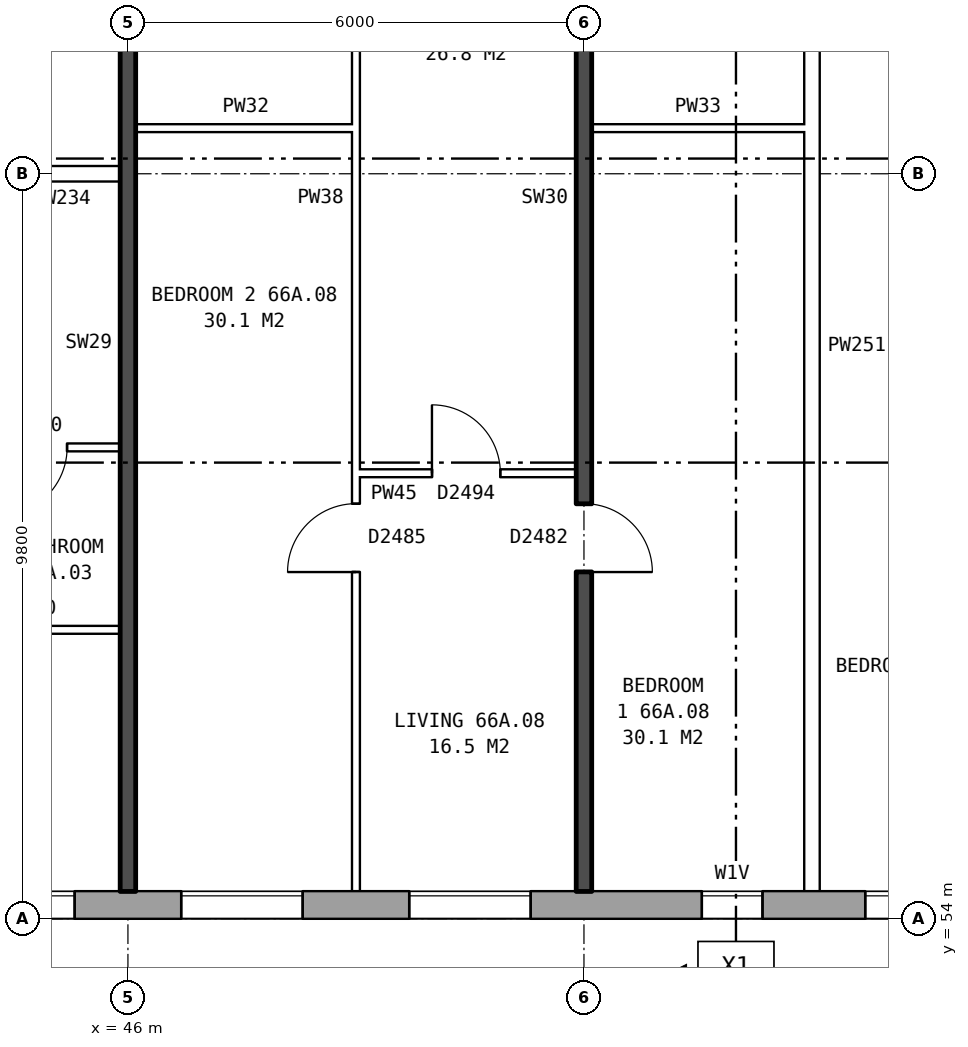
"""IFC4 building model, lengths in metres.
Left out: names, types, materials, properties, quantities, classifications, styles, units other than length and angle.
Written with IfcOpenShell. Run it as: python <this file> out.ifc"""

import sys

from ifc_helpers import new_model, si_unit, direction, frame, frame_2d, origin, place, context, subcontext, project, spatial, rectangle, extrude, element, fill, save


model = new_model("IFC4")
c1 = context("Model", 3, precision=1e-05, world=origin(), true_north=direction((0.0, 1.0)))
c2 = subcontext(c1, "Body", "Model", "MODEL_VIEW")
j1 = project(units=[si_unit("LENGTHUNIT", "METRE"), si_unit("PLANEANGLEUNIT", "RADIAN")], contexts=[c1])
p1 = place(None, origin())
s1 = spatial("IfcSite", under=j1, at=p1, CompositionType="ELEMENT")
p2 = place(p1, origin())
s2 = spatial("IfcBuilding", under=s1, at=p2, CompositionType="ELEMENT")
p3 = place(p2, frame((0.0, 0.0, 233.8)))
s3 = spatial("IfcBuildingStorey", under=s2, at=p3, CompositionType="ELEMENT", Elevation=233.8)
p4 = place(p3, frame((35.075, 54.18, 0.0), z_axis=(0.0, 0.0, 1.0), x_axis=(1.0, 0.0, 0.0)))
e1 = element("IfcWall", 1, at=p4, inside=s3, PredefinedType="STANDARD", context=c2, shape_type="SweptSolid", body=[
    extrude(rectangle(XDim=39.875, YDim=0.36, at=frame_2d((19.938, 0.0))), origin(), (0.0, 0.0, 1.0), 2.85),
])
p5 = place(p4, frame((2.625, 0.0, 0.8)))
e2 = element("IfcOpeningElement", 2, at=p5, cuts=e1, PredefinedType="OPENING", context=c2, shape_type="SweptSolid", body=[
    extrude(rectangle(XDim=1.6, YDim=1.8, at=frame_2d((0.8, 0.9))), frame((0.0, 0.19, 0.0), z_axis=(0.0, -1.0, 0.0), x_axis=(1.0, 0.0, 0.0)), (0.0, 0.0, 1.0), 0.38),
])
p6 = place(p4, frame((5.625, 0.0, 0.8)))
e3 = element("IfcOpeningElement", 3, at=p6, cuts=e1, PredefinedType="OPENING", context=c2, shape_type="SweptSolid", body=[
    extrude(rectangle(XDim=1.6, YDim=1.8, at=frame_2d((0.8, 0.9))), frame((0.0, 0.19, 0.0), z_axis=(0.0, -1.0, 0.0), x_axis=(1.0, 0.0, 0.0)), (0.0, 0.0, 1.0), 0.38),
])
p7 = place(p4, frame((8.625, 0.0, 0.8)))
e4 = element("IfcOpeningElement", 4, at=p7, cuts=e1, PredefinedType="OPENING", context=c2, shape_type="SweptSolid", body=[
    extrude(rectangle(XDim=1.6, YDim=1.8, at=frame_2d((0.8, 0.9))), frame((0.0, 0.19, 0.0), z_axis=(0.0, -1.0, 0.0), x_axis=(1.0, 0.0, 0.0)), (0.0, 0.0, 1.0), 0.38),
])
p8 = place(p4, frame((11.625, 0.0, 0.8)))
e5 = element("IfcOpeningElement", 5, at=p8, cuts=e1, PredefinedType="OPENING", context=c2, shape_type="SweptSolid", body=[
    extrude(rectangle(XDim=1.6, YDim=1.8, at=frame_2d((0.8, 0.9))), frame((0.0, 0.19, 0.0), z_axis=(0.0, -1.0, 0.0), x_axis=(1.0, 0.0, 0.0)), (0.0, 0.0, 1.0), 0.38),
])
p9 = place(p4, frame((14.625, 0.0, 0.8)))
e6 = element("IfcOpeningElement", 6, at=p9, cuts=e1, PredefinedType="OPENING", context=c2, shape_type="SweptSolid", body=[
    extrude(rectangle(XDim=1.6, YDim=1.8, at=frame_2d((0.8, 0.9))), frame((0.0, 0.19, 0.0), z_axis=(0.0, -1.0, 0.0), x_axis=(1.0, 0.0, 0.0)), (0.0, 0.0, 1.0), 0.38),
])
p10 = place(p4, frame((18.475, 0.0, 0.15)))
e7 = element("IfcOpeningElement", 7, at=p10, cuts=e1, PredefinedType="OPENING", context=c2, shape_type="SweptSolid", body=[
    extrude(rectangle(XDim=0.8, YDim=0.9, at=frame_2d((0.4, 0.45))), frame((0.0, 0.19, 0.0), z_axis=(0.0, -1.0, 0.0), x_axis=(1.0, 0.0, 0.0)), (0.0, 0.0, 1.0), 0.38),
])
p11 = place(p4, frame((20.625, 0.0, 0.8)))
e8 = element("IfcOpeningElement", 8, at=p11, cuts=e1, PredefinedType="OPENING", context=c2, shape_type="SweptSolid", body=[
    extrude(rectangle(XDim=1.6, YDim=1.8, at=frame_2d((0.8, 0.9))), frame((0.0, 0.19, 0.0), z_axis=(0.0, -1.0, 0.0), x_axis=(1.0, 0.0, 0.0)), (0.0, 0.0, 1.0), 0.38),
])
p12 = place(p4, frame((23.625, 0.0, 0.8)))
e9 = element("IfcOpeningElement", 9, at=p12, cuts=e1, PredefinedType="OPENING", context=c2, shape_type="SweptSolid", body=[
    extrude(rectangle(XDim=1.6, YDim=1.8, at=frame_2d((0.8, 0.9))), frame((0.0, 0.19, 0.0), z_axis=(0.0, -1.0, 0.0), x_axis=(1.0, 0.0, 0.0)), (0.0, 0.0, 1.0), 0.38),
])
p13 = place(p4, frame((26.625, 0.0, 0.8)))
e10 = element("IfcOpeningElement", 10, at=p13, cuts=e1, PredefinedType="OPENING", context=c2, shape_type="SweptSolid", body=[
    extrude(rectangle(XDim=1.6, YDim=1.8, at=frame_2d((0.8, 0.9))), frame((0.0, 0.19, 0.0), z_axis=(0.0, -1.0, 0.0), x_axis=(1.0, 0.0, 0.0)), (0.0, 0.0, 1.0), 0.38),
])
p14 = place(p4, frame((29.625, 0.0, 0.8)))
e11 = element("IfcOpeningElement", 11, at=p14, cuts=e1, PredefinedType="OPENING", context=c2, shape_type="SweptSolid", body=[
    extrude(rectangle(XDim=1.6, YDim=1.8, at=frame_2d((0.8, 0.9))), frame((0.0, 0.19, 0.0), z_axis=(0.0, -1.0, 0.0), x_axis=(1.0, 0.0, 0.0)), (0.0, 0.0, 1.0), 0.38),
])
p15 = place(p4, frame((32.625, 0.0, 0.8)))
e12 = element("IfcOpeningElement", 12, at=p15, cuts=e1, PredefinedType="OPENING", context=c2, shape_type="SweptSolid", body=[
    extrude(rectangle(XDim=1.6, YDim=1.8, at=frame_2d((0.8, 0.9))), frame((0.0, 0.19, 0.0), z_axis=(0.0, -1.0, 0.0), x_axis=(1.0, 0.0, 0.0)), (0.0, 0.0, 1.0), 0.38),
])
p16 = place(p4, frame((35.625, 0.0, 0.8)))
e13 = element("IfcOpeningElement", 13, at=p16, cuts=e1, PredefinedType="OPENING", context=c2, shape_type="SweptSolid", body=[
    extrude(rectangle(XDim=1.6, YDim=1.8, at=frame_2d((0.8, 0.9))), frame((0.0, 0.19, 0.0), z_axis=(0.0, -1.0, 0.0), x_axis=(1.0, 0.0, 0.0)), (0.0, 0.0, 1.0), 0.38),
])
p17 = place(p3, frame((43.6, 57.8, 0.0), z_axis=(0.0, 0.0, 1.0), x_axis=(1.0, 0.0, 0.0)))
e14 = element("IfcWall", 14, at=p17, inside=s3, PredefinedType="PARTITIONING", context=c2, shape_type="SweptSolid", body=[
    extrude(rectangle(XDim=2.3, YDim=0.1, at=frame_2d((1.15, 0.0))), origin(), (0.0, 0.0, 1.0), 2.85),
])
p18 = place(p3, frame((49.0, 59.86, 0.0), z_axis=(0.0, 0.0, 1.0), x_axis=(1.0, 0.0, 0.0)))
e15 = element("IfcWall", 15, at=p18, inside=s3, PredefinedType="PARTITIONING", context=c2, shape_type="SweptSolid", body=[
    extrude(rectangle(XDim=2.9, YDim=0.1, at=frame_2d((1.45, 0.0))), origin(), (0.0, 0.0, 1.0), 2.85),
])
p19 = place(p18, frame((1.0, 0.0, 0.0)))
e16 = element("IfcOpeningElement", 16, at=p19, cuts=e15, PredefinedType="OPENING", context=c2, shape_type="SweptSolid", body=[
    extrude(rectangle(XDim=0.9, YDim=2.1, at=frame_2d((0.45, 1.05))), frame((0.0, 0.06, 0.0), z_axis=(0.0, -1.0, 0.0), x_axis=(1.0, 0.0, 0.0)), (0.0, 0.0, 1.0), 0.12),
])
p20 = place(p3, frame((40.1, 60.2, 0.0), z_axis=(0.0, 0.0, 1.0), x_axis=(1.0, 0.0, 0.0)))
e17 = element("IfcWall", 17, at=p20, inside=s3, PredefinedType="PARTITIONING", context=c2, shape_type="SweptSolid", body=[
    extrude(rectangle(XDim=5.8, YDim=0.1, at=frame_2d((2.9, 0.0))), origin(), (0.0, 0.0, 1.0), 2.85),
])
p21 = place(p20, frame((1.3, 0.0, 0.0)))
e18 = element("IfcOpeningElement", 18, at=p21, cuts=e17, PredefinedType="OPENING", context=c2, shape_type="SweptSolid", body=[
    extrude(rectangle(XDim=0.9, YDim=2.1, at=frame_2d((0.45, 1.05))), frame((0.0, 0.06, 0.0), z_axis=(0.0, -1.0, 0.0), x_axis=(1.0, 0.0, 0.0)), (0.0, 0.0, 1.0), 0.12),
])
p22 = place(p20, frame((4.2, 0.0, 0.0)))
e19 = element("IfcOpeningElement", 19, at=p22, cuts=e17, PredefinedType="OPENING", context=c2, shape_type="SweptSolid", body=[
    extrude(rectangle(XDim=0.9, YDim=2.1, at=frame_2d((0.45, 1.05))), frame((0.0, 0.06, 0.0), z_axis=(0.0, -1.0, 0.0), x_axis=(1.0, 0.0, 0.0)), (0.0, 0.0, 1.0), 0.12),
])
p23 = place(p3, frame((44.36, 63.8, 0.0), z_axis=(0.0, 0.0, 1.0), x_axis=(1.0, 0.0, 0.0)))
e20 = element("IfcWall", 20, at=p23, inside=s3, PredefinedType="PARTITIONING", context=c2, shape_type="SweptSolid", body=[
    extrude(rectangle(XDim=1.54, YDim=0.2, at=frame_2d((0.77, 0.0))), origin(), (0.0, 0.0, 1.0), 2.85),
])
p24 = place(p3, frame((46.1, 64.4, 0.0), z_axis=(0.0, 0.0, 1.0), x_axis=(1.0, 0.0, 0.0)))
e21 = element("IfcWall", 21, at=p24, inside=s3, PredefinedType="PARTITIONING", context=c2, shape_type="SweptSolid", body=[
    extrude(rectangle(XDim=2.9, YDim=0.1, at=frame_2d((1.45, 0.0))), origin(), (0.0, 0.0, 1.0), 2.85),
])
p25 = place(p3, frame((52.1, 64.4, 0.0), z_axis=(0.0, 0.0, 1.0), x_axis=(1.0, 0.0, 0.0)))
e22 = element("IfcWall", 22, at=p25, inside=s3, PredefinedType="PARTITIONING", context=c2, shape_type="SweptSolid", body=[
    extrude(rectangle(XDim=2.8, YDim=0.1, at=frame_2d((1.4, 0.0))), origin(), (0.0, 0.0, 1.0), 2.85),
])
p26 = place(p3, frame((46.0, 54.36, 0.0), z_axis=(0.0, 0.0, 1.0), x_axis=(0.0, 1.0, 0.0)))
e23 = element("IfcWall", 23, at=p26, inside=s3, PredefinedType="SOLIDWALL", context=c2, shape_type="SweptSolid", body=[
    extrude(rectangle(XDim=14.44, YDim=0.2, at=frame_2d((7.22, 0.0))), origin(), (0.0, 0.0, 1.0), 2.85),
])
p27 = place(p3, frame((49.0, 54.36, 0.0), z_axis=(0.0, 0.0, 1.0), x_axis=(0.0, 1.0, 0.0)))
e24 = element("IfcWall", 24, at=p27, inside=s3, PredefinedType="PARTITIONING", context=c2, shape_type="SweptSolid", body=[
    extrude(rectangle(XDim=14.34, YDim=0.1, at=frame_2d((7.17, 0.0))), origin(), (0.0, 0.0, 1.0), 2.85),
])
p28 = place(p27, frame((4.2, 0.0, 0.0)))
e25 = element("IfcOpeningElement", 25, at=p28, cuts=e24, PredefinedType="OPENING", context=c2, shape_type="SweptSolid", body=[
    extrude(rectangle(XDim=0.9, YDim=2.1, at=frame_2d((0.45, 1.05))), frame((0.0, 0.06, 0.0), z_axis=(0.0, -1.0, 0.0), x_axis=(1.0, 0.0, 0.0)), (0.0, 0.0, 1.0), 0.12),
])
p29 = place(p27, frame((13.14, 0.0, 0.0)))
e26 = element("IfcOpeningElement", 26, at=p29, cuts=e24, PredefinedType="OPENING", context=c2, shape_type="SweptSolid", body=[
    extrude(rectangle(XDim=0.8, YDim=2.1, at=frame_2d((0.4, 1.05))), frame((0.0, 0.06, 0.0), z_axis=(0.0, -1.0, 0.0), x_axis=(1.0, 0.0, 0.0)), (0.0, 0.0, 1.0), 0.12),
])
p30 = place(p3, frame((52.0, 54.36, 0.0), z_axis=(0.0, 0.0, 1.0), x_axis=(0.0, 1.0, 0.0)))
e27 = element("IfcWall", 27, at=p30, inside=s3, PredefinedType="SOLIDWALL", context=c2, shape_type="SweptSolid", body=[
    extrude(rectangle(XDim=14.44, YDim=0.2, at=frame_2d((7.22, 0.0))), origin(), (0.0, 0.0, 1.0), 2.85),
])
p31 = place(p30, frame((4.2, 0.0, 0.0)))
e28 = element("IfcOpeningElement", 28, at=p31, cuts=e27, PredefinedType="OPENING", context=c2, shape_type="SweptSolid", body=[
    extrude(rectangle(XDim=0.9, YDim=2.1, at=frame_2d((0.45, 1.05))), frame((0.0, 0.11, 0.0), z_axis=(0.0, -1.0, 0.0), x_axis=(1.0, 0.0, 0.0)), (0.0, 0.0, 1.0), 0.22),
])
p32 = place(p30, frame((13.14, 0.0, 0.0)))
e29 = element("IfcOpeningElement", 29, at=p32, cuts=e27, PredefinedType="OPENING", context=c2, shape_type="SweptSolid", body=[
    extrude(rectangle(XDim=0.9, YDim=2.1, at=frame_2d((0.45, 1.05))), frame((0.0, 0.11, 0.0), z_axis=(0.0, -1.0, 0.0), x_axis=(1.0, 0.0, 0.0)), (0.0, 0.0, 1.0), 0.22),
])
p33 = place(p3, frame((55.0, 54.36, 0.0), z_axis=(0.0, 0.0, 1.0), x_axis=(0.0, 1.0, 0.0)))
e30 = element("IfcWall", 30, at=p33, inside=s3, PredefinedType="PARTITIONING", context=c2, shape_type="SweptSolid", body=[
    extrude(rectangle(XDim=14.34, YDim=0.2, at=frame_2d((7.17, 0.0))), origin(), (0.0, 0.0, 1.0), 2.85),
])
p34 = place(p7, origin())
e31 = element("IfcWindow", 31, at=p34, inside=s3, PartitioningType="SINGLE_PANEL", PredefinedType="WINDOW", context=c2, shape_type="SweptSolid", body=[
    extrude(rectangle(XDim=1.6, YDim=1.8, at=frame_2d((0.8, 0.9))), frame((0.0, 0.15, 0.0), z_axis=(0.0, -1.0, 0.0), x_axis=(1.0, 0.0, 0.0)), (0.0, 0.0, 1.0), 0.06),
])
fill(e4, e31)
p35 = place(p8, origin())
e32 = element("IfcWindow", 32, at=p35, inside=s3, PartitioningType="SINGLE_PANEL", PredefinedType="WINDOW", context=c2, shape_type="SweptSolid", body=[
    extrude(rectangle(XDim=1.6, YDim=1.8, at=frame_2d((0.8, 0.9))), frame((0.0, 0.15, 0.0), z_axis=(0.0, -1.0, 0.0), x_axis=(1.0, 0.0, 0.0)), (0.0, 0.0, 1.0), 0.06),
])
fill(e5, e32)
p36 = place(p9, origin())
e33 = element("IfcWindow", 33, at=p36, inside=s3, PartitioningType="SINGLE_PANEL", PredefinedType="WINDOW", context=c2, shape_type="SweptSolid", body=[
    extrude(rectangle(XDim=1.6, YDim=1.8, at=frame_2d((0.8, 0.9))), frame((0.0, 0.15, 0.0), z_axis=(0.0, -1.0, 0.0), x_axis=(1.0, 0.0, 0.0)), (0.0, 0.0, 1.0), 0.06),
])
fill(e6, e33)
p37 = place(p10, origin())
e34 = element("IfcWindow", 34, at=p37, inside=s3, PartitioningType="SINGLE_PANEL", PredefinedType="WINDOW", context=c2, shape_type="SweptSolid", body=[
    extrude(rectangle(XDim=0.8, YDim=0.9, at=frame_2d((0.4, 0.45))), frame((0.0, 0.15, 0.0), z_axis=(0.0, -1.0, 0.0), x_axis=(1.0, 0.0, 0.0)), (0.0, 0.0, 1.0), 0.06),
])
fill(e7, e34)
p38 = place(p11, origin())
e35 = element("IfcWindow", 35, at=p38, inside=s3, PartitioningType="SINGLE_PANEL", PredefinedType="WINDOW", context=c2, shape_type="SweptSolid", body=[
    extrude(rectangle(XDim=1.6, YDim=1.8, at=frame_2d((0.8, 0.9))), frame((0.0, 0.15, 0.0), z_axis=(0.0, -1.0, 0.0), x_axis=(1.0, 0.0, 0.0)), (0.0, 0.0, 1.0), 0.06),
])
fill(e8, e35)
p39 = place(p22, frame((0.9, 0.0, 0.0), z_axis=(0.0, 0.0, 1.0), x_axis=(-1.0, 0.0, 0.0)))
e36 = element("IfcDoor", 36, at=p39, inside=s3, OperationType="SINGLE_SWING_RIGHT", PredefinedType="DOOR", context=c2, shape_type="SweptSolid", body=[
    extrude(rectangle(XDim=0.9, YDim=2.1, at=frame_2d((0.45, 1.05))), frame((0.0, 0.025, 0.0), z_axis=(0.0, -1.0, 0.0), x_axis=(1.0, 0.0, 0.0)), (0.0, 0.0, 1.0), 0.05),
])
fill(e19, e36)
p40 = place(p31, frame((0.9, 0.0, 0.0), z_axis=(0.0, 0.0, 1.0), x_axis=(-1.0, 0.0, 0.0)))
e37 = element("IfcDoor", 37, at=p40, inside=s3, OperationType="SINGLE_SWING_RIGHT", PredefinedType="DOOR", context=c2, shape_type="SweptSolid", body=[
    extrude(rectangle(XDim=0.9, YDim=2.1, at=frame_2d((0.45, 1.05))), frame((0.0, 0.025, 0.0), z_axis=(0.0, -1.0, 0.0), x_axis=(1.0, 0.0, 0.0)), (0.0, 0.0, 1.0), 0.05),
])
fill(e28, e37)
p41 = place(p28, origin())
e38 = element("IfcDoor", 38, at=p41, inside=s3, OperationType="SINGLE_SWING_LEFT", PredefinedType="DOOR", context=c2, shape_type="SweptSolid", body=[
    extrude(rectangle(XDim=0.9, YDim=2.1, at=frame_2d((0.45, 1.05))), frame((0.0, 0.025, 0.0), z_axis=(0.0, -1.0, 0.0), x_axis=(1.0, 0.0, 0.0)), (0.0, 0.0, 1.0), 0.05),
])
fill(e25, e38)
p42 = place(p19, origin())
e39 = element("IfcDoor", 39, at=p42, inside=s3, OperationType="SINGLE_SWING_LEFT", PredefinedType="DOOR", context=c2, shape_type="SweptSolid", body=[
    extrude(rectangle(XDim=0.9, YDim=2.1, at=frame_2d((0.45, 1.05))), frame((0.0, 0.025, 0.0), z_axis=(0.0, -1.0, 0.0), x_axis=(1.0, 0.0, 0.0)), (0.0, 0.0, 1.0), 0.05),
])
fill(e16, e39)
save(model, sys.argv[1])
